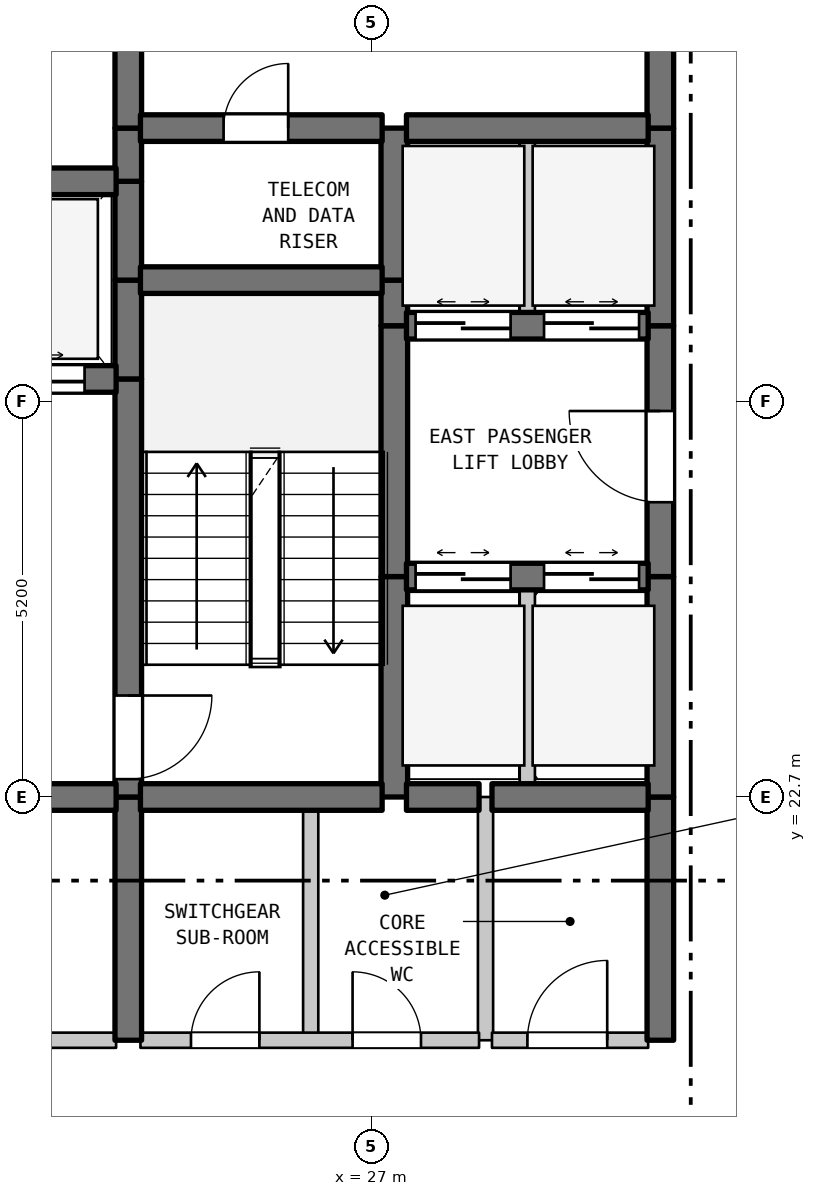
"""IFC4 building model, lengths in metres.
Left out: names, types, materials, properties, quantities, classifications, styles, units other than length and angle.
Written with IfcOpenShell. Run it as: python <this file> out.ifc"""

import sys

from ifc_helpers import new_model, si_unit, direction, frame, frame_2d, origin, place, context, subcontext, project, spatial, rectangle, extrude, element, fill, save


model = new_model("IFC4")
c1 = context("Model", 3, precision=1e-05, world=origin(), true_north=direction((0.0, 1.0)))
c2 = subcontext(c1, "Body", "Model", "MODEL_VIEW")
j1 = project(units=[si_unit("LENGTHUNIT", "METRE"), si_unit("PLANEANGLEUNIT", "RADIAN")], contexts=[c1])
p1 = place(None, origin())
s1 = spatial("IfcSite", under=j1, at=p1, CompositionType="ELEMENT")
p2 = place(p1, origin())
s2 = spatial("IfcBuilding", under=s1, at=p2, CompositionType="ELEMENT")
p3 = place(p2, frame((0.0, 0.0, 73.8)))
s3 = spatial("IfcBuildingStorey", under=s2, at=p3, CompositionType="ELEMENT", Elevation=73.8)
p4 = place(p3, frame((23.8, 19.5, 0.0), z_axis=(0.0, 0.0, 1.0), x_axis=(0.0, 1.0, 0.0)))
e1 = element("IfcWall", 1, at=p4, inside=s3, PredefinedType="SHEAR", context=c2, shape_type="SweptSolid", body=[
    extrude(rectangle(XDim=3.2, YDim=0.35, at=frame_2d((1.6, 0.0))), origin(), (0.0, 0.0, 1.0), 3.385),
])
p5 = place(p3, frame((23.8, 22.7, 0.0), z_axis=(0.0, 0.0, 1.0), x_axis=(0.0, 1.0, 0.0)))
e2 = element("IfcWall", 2, at=p5, inside=s3, PredefinedType="SHEAR", context=c2, shape_type="SweptSolid", body=[
    extrude(rectangle(XDim=5.5, YDim=0.35, at=frame_2d((2.75, 0.0))), origin(), (0.0, 0.0, 1.0), 3.385),
])
p6 = place(p5, frame((0.235, 0.0, 0.0)))
e3 = element("IfcOpeningElement", 3, at=p6, cuts=e2, PredefinedType="OPENING", context=c2, shape_type="SweptSolid", body=[
    extrude(rectangle(XDim=1.1, YDim=2.15, at=frame_2d((0.55, 1.075))), frame((0.0, 0.185, 0.0), z_axis=(0.0, -1.0, 0.0), x_axis=(1.0, 0.0, 0.0)), (0.0, 0.0, 1.0), 0.37),
])
for number, where, z_axis, x_axis in (
    (4, (23.8, 28.2, 0.0), (0.0, 0.0, 1.0), (0.0, 1.0, 0.0)),
    (5, (23.8, 29.5, 0.0), (0.0, 0.0, 1.0), (0.0, 1.0, 0.0)),
):
    element("IfcWall", number, at=place(p3, frame(where, z_axis=z_axis, x_axis=x_axis)), inside=s3, PredefinedType="SHEAR", context=c2, shape_type="SweptSolid", body=[
        extrude(rectangle(XDim=1.3, YDim=0.35, at=frame_2d((0.65, 0.0))), origin(), (0.0, 0.0, 1.0), 3.385),
    ])
p7 = place(p3, frame((23.8, 30.8, 0.0), z_axis=(0.0, 0.0, 1.0), x_axis=(0.0, 1.0, 0.0)))
e6 = element("IfcWall", 6, at=p7, inside=s3, PredefinedType="SHEAR", context=c2, shape_type="SweptSolid", body=[
    extrude(rectangle(XDim=0.7, YDim=0.35, at=frame_2d((0.35, 0.0))), origin(), (0.0, 0.0, 1.0), 3.385),
])
p8 = place(p3, frame((23.8, 31.5, 0.0), z_axis=(0.0, 0.0, 1.0), x_axis=(0.0, 1.0, 0.0)))
e7 = element("IfcWall", 7, at=p8, inside=s3, PredefinedType="SHEAR", context=c2, shape_type="SweptSolid", body=[
    extrude(rectangle(XDim=3.5, YDim=0.35, at=frame_2d((1.75, 0.0))), origin(), (0.0, 0.0, 1.0), 3.385),
])
p9 = place(p8, frame((1.127, 0.0, 0.0)))
e8 = element("IfcOpeningElement", 8, at=p9, cuts=e7, PredefinedType="OPENING", context=c2, shape_type="SweptSolid", body=[
    extrude(rectangle(XDim=1.1, YDim=2.15, at=frame_2d((0.55, 1.075))), frame((0.0, 0.185, 0.0), z_axis=(0.0, -1.0, 0.0), x_axis=(1.0, 0.0, 0.0)), (0.0, 0.0, 1.0), 0.37),
])
p10 = place(p3, frame((26.2, 19.5, 0.0), z_axis=(0.0, 0.0, 1.0), x_axis=(0.0, 1.0, 0.0)))
e9 = element("IfcWall", 9, at=p10, inside=s3, PredefinedType="STANDARD", context=c2, shape_type="SweptSolid", body=[
    extrude(rectangle(XDim=3.2, YDim=0.2, at=frame_2d((1.6, 0.0))), origin(), (0.0, 0.0, 1.0), 3.385),
])
p11 = place(p3, frame((27.3, 22.7, 0.0), z_axis=(0.0, 0.0, 1.0), x_axis=(0.0, 1.0, 0.0)))
e10 = element("IfcWall", 10, at=p11, inside=s3, PredefinedType="SHEAR", context=c2, shape_type="SweptSolid", body=[
    extrude(rectangle(XDim=2.9, YDim=0.35, at=frame_2d((1.45, 0.0))), origin(), (0.0, 0.0, 1.0), 3.385),
])
p12 = place(p3, frame((27.3, 25.6, 0.0), z_axis=(0.0, 0.0, 1.0), x_axis=(0.0, 1.0, 0.0)))
e11 = element("IfcWall", 11, at=p12, inside=s3, PredefinedType="SHEAR", context=c2, shape_type="SweptSolid", body=[
    extrude(rectangle(XDim=3.3, YDim=0.35, at=frame_2d((1.65, 0.0))), origin(), (0.0, 0.0, 1.0), 3.385),
])
p13 = place(p3, frame((27.3, 28.9, 0.0), z_axis=(0.0, 0.0, 1.0), x_axis=(0.0, 1.0, 0.0)))
e12 = element("IfcWall", 12, at=p13, inside=s3, PredefinedType="SHEAR", context=c2, shape_type="SweptSolid", body=[
    extrude(rectangle(XDim=0.6, YDim=0.35, at=frame_2d((0.3, 0.0))), origin(), (0.0, 0.0, 1.0), 3.385),
])
p14 = place(p3, frame((27.3, 29.5, 0.0), z_axis=(0.0, 0.0, 1.0), x_axis=(0.0, 1.0, 0.0)))
e13 = element("IfcWall", 13, at=p14, inside=s3, PredefinedType="SHEAR", context=c2, shape_type="SweptSolid", body=[
    extrude(rectangle(XDim=2.0, YDim=0.35, at=frame_2d((1.0, 0.0))), origin(), (0.0, 0.0, 1.0), 3.385),
])
p15 = place(p3, frame((28.5, 19.5, 0.0), z_axis=(0.0, 0.0, 1.0), x_axis=(0.0, 1.0, 0.0)))
e14 = element("IfcWall", 14, at=p15, inside=s3, PredefinedType="STANDARD", context=c2, shape_type="SweptSolid", body=[
    extrude(rectangle(XDim=3.2, YDim=0.2, at=frame_2d((1.6, 0.0))), origin(), (0.0, 0.0, 1.0), 3.385),
])
p16 = place(p3, frame((29.05, 22.7, 0.0), z_axis=(0.0, 0.0, 1.0), x_axis=(0.0, 1.0, 0.0)))
e15 = element("IfcWall", 15, at=p16, inside=s3, PredefinedType="STANDARD", context=c2, shape_type="SweptSolid", body=[
    extrude(rectangle(XDim=2.9, YDim=0.2, at=frame_2d((1.45, 0.0))), origin(), (0.0, 0.0, 1.0), 3.385),
])
p17 = place(p3, frame((29.05, 28.9, 0.0), z_axis=(0.0, 0.0, 1.0), x_axis=(0.0, 1.0, 0.0)))
e16 = element("IfcWall", 16, at=p17, inside=s3, PredefinedType="STANDARD", context=c2, shape_type="SweptSolid", body=[
    extrude(rectangle(XDim=2.6, YDim=0.2, at=frame_2d((1.3, 0.0))), origin(), (0.0, 0.0, 1.0), 3.385),
])
p18 = place(p3, frame((30.8, 19.5, 0.0), z_axis=(0.0, 0.0, 1.0), x_axis=(0.0, 1.0, 0.0)))
e17 = element("IfcWall", 17, at=p18, inside=s3, PredefinedType="SHEAR", context=c2, shape_type="SweptSolid", body=[
    extrude(rectangle(XDim=3.2, YDim=0.35, at=frame_2d((1.6, 0.0))), origin(), (0.0, 0.0, 1.0), 3.385),
])
p19 = place(p3, frame((30.8, 22.7, 0.0), z_axis=(0.0, 0.0, 1.0), x_axis=(0.0, 1.0, 0.0)))
e18 = element("IfcWall", 18, at=p19, inside=s3, PredefinedType="SHEAR", context=c2, shape_type="SweptSolid", body=[
    extrude(rectangle(XDim=2.9, YDim=0.35, at=frame_2d((1.45, 0.0))), origin(), (0.0, 0.0, 1.0), 3.385),
])
p20 = place(p3, frame((30.8, 25.6, 0.0), z_axis=(0.0, 0.0, 1.0), x_axis=(0.0, 1.0, 0.0)))
e19 = element("IfcWall", 19, at=p20, inside=s3, PredefinedType="SHEAR", context=c2, shape_type="SweptSolid", body=[
    extrude(rectangle(XDim=3.3, YDim=0.35, at=frame_2d((1.65, 0.0))), origin(), (0.0, 0.0, 1.0), 3.385),
])
p21 = place(p20, frame((0.978, 0.0, 0.0)))
e20 = element("IfcOpeningElement", 20, at=p21, cuts=e19, PredefinedType="OPENING", context=c2, shape_type="SweptSolid", body=[
    extrude(rectangle(XDim=1.2, YDim=2.2, at=frame_2d((0.6, 1.1))), frame((0.0, 0.185, 0.0), z_axis=(0.0, -1.0, 0.0), x_axis=(1.0, 0.0, 0.0)), (0.0, 0.0, 1.0), 0.37),
])
p22 = place(p3, frame((30.8, 28.9, 0.0), z_axis=(0.0, 0.0, 1.0), x_axis=(0.0, 1.0, 0.0)))
e21 = element("IfcWall", 21, at=p22, inside=s3, PredefinedType="SHEAR", context=c2, shape_type="SweptSolid", body=[
    extrude(rectangle(XDim=2.6, YDim=0.35, at=frame_2d((1.3, 0.0))), origin(), (0.0, 0.0, 1.0), 3.385),
])
p23 = place(p3, frame((30.8, 31.5, 0.0), z_axis=(0.0, 0.0, 1.0), x_axis=(0.0, 1.0, 0.0)))
e22 = element("IfcWall", 22, at=p23, inside=s3, PredefinedType="SHEAR", context=c2, shape_type="SweptSolid", body=[
    extrude(rectangle(XDim=3.5, YDim=0.35, at=frame_2d((1.75, 0.0))), origin(), (0.0, 0.0, 1.0), 3.385),
])
p24 = place(p23, frame((1.15, 0.0, 0.0)))
e23 = element("IfcOpeningElement", 23, at=p24, cuts=e22, PredefinedType="OPENING", context=c2, shape_type="SweptSolid", body=[
    extrude(rectangle(XDim=1.2, YDim=2.2, at=frame_2d((0.6, 1.1))), frame((0.0, 0.185, 0.0), z_axis=(0.0, -1.0, 0.0), x_axis=(1.0, 0.0, 0.0)), (0.0, 0.0, 1.0), 0.37),
])
p25 = place(p3, frame((19.16, 19.5, 0.0), z_axis=(0.0, 0.0, 1.0), x_axis=(1.0, 0.0, 0.0)))
e24 = element("IfcWall", 24, at=p25, inside=s3, PredefinedType="STANDARD", context=c2, shape_type="SweptSolid", body=[
    extrude(rectangle(XDim=4.48, YDim=0.2, at=frame_2d((2.24, 0.0))), origin(), (0.0, 0.0, 1.0), 3.385),
])
p26 = place(p25, frame((1.64, 0.0, 0.0)))
e25 = element("IfcOpeningElement", 25, at=p26, cuts=e24, PredefinedType="OPENING", context=c2, shape_type="SweptSolid", body=[
    extrude(rectangle(XDim=1.2, YDim=2.2, at=frame_2d((0.6, 1.1))), frame((0.0, 0.11, 0.0), z_axis=(0.0, -1.0, 0.0), x_axis=(1.0, 0.0, 0.0)), (0.0, 0.0, 1.0), 0.22),
])
p27 = place(p3, frame((23.96, 19.5, 0.0), z_axis=(0.0, 0.0, 1.0), x_axis=(1.0, 0.0, 0.0)))
e26 = element("IfcWall", 26, at=p27, inside=s3, PredefinedType="STANDARD", context=c2, shape_type="SweptSolid", body=[
    extrude(rectangle(XDim=4.455, YDim=0.2, at=frame_2d((2.228, 0.0))), origin(), (0.0, 0.0, 1.0), 3.385),
])
p28 = place(p27, frame((0.665, 0.0, 0.0)))
e27 = element("IfcOpeningElement", 27, at=p28, cuts=e26, PredefinedType="OPENING", context=c2, shape_type="SweptSolid", body=[
    extrude(rectangle(XDim=0.9, YDim=2.15, at=frame_2d((0.45, 1.075))), frame((0.0, 0.11, 0.0), z_axis=(0.0, -1.0, 0.0), x_axis=(1.0, 0.0, 0.0)), (0.0, 0.0, 1.0), 0.22),
])
p29 = place(p27, frame((2.791, 0.0, 0.0)))
e28 = element("IfcOpeningElement", 28, at=p29, cuts=e26, PredefinedType="OPENING", context=c2, shape_type="SweptSolid", body=[
    extrude(rectangle(XDim=0.9, YDim=2.15, at=frame_2d((0.45, 1.075))), frame((0.0, 0.11, 0.0), z_axis=(0.0, -1.0, 0.0), x_axis=(1.0, 0.0, 0.0)), (0.0, 0.0, 1.0), 0.22),
])
p30 = place(p3, frame((28.585, 19.5, 0.0), z_axis=(0.0, 0.0, 1.0), x_axis=(1.0, 0.0, 0.0)))
e29 = element("IfcWall", 29, at=p30, inside=s3, PredefinedType="STANDARD", context=c2, shape_type="SweptSolid", body=[
    extrude(rectangle(XDim=2.055, YDim=0.2, at=frame_2d((1.027, 0.0))), origin(), (0.0, 0.0, 1.0), 3.385),
])
p31 = place(p30, frame((0.466, 0.0, 0.0)))
e30 = element("IfcOpeningElement", 30, at=p31, cuts=e29, PredefinedType="OPENING", context=c2, shape_type="SweptSolid", body=[
    extrude(rectangle(XDim=1.05, YDim=2.15, at=frame_2d((0.525, 1.075))), frame((0.0, 0.11, 0.0), z_axis=(0.0, -1.0, 0.0), x_axis=(1.0, 0.0, 0.0)), (0.0, 0.0, 1.0), 0.22),
])
p32 = place(p3, frame((19.16, 22.7, 0.0), z_axis=(0.0, 0.0, 1.0), x_axis=(1.0, 0.0, 0.0)))
e31 = element("IfcWall", 31, at=p32, inside=s3, PredefinedType="SHEAR", context=c2, shape_type="SweptSolid", body=[
    extrude(rectangle(XDim=4.48, YDim=0.35, at=frame_2d((2.24, 0.0))), origin(), (0.0, 0.0, 1.0), 3.385),
])
p33 = place(p32, frame((1.64, 0.0, 0.0)))
e32 = element("IfcOpeningElement", 32, at=p33, cuts=e31, PredefinedType="OPENING", context=c2, shape_type="SweptSolid", body=[
    extrude(rectangle(XDim=1.2, YDim=2.2, at=frame_2d((0.6, 1.1))), frame((0.0, 0.185, 0.0), z_axis=(0.0, -1.0, 0.0), x_axis=(1.0, 0.0, 0.0)), (0.0, 0.0, 1.0), 0.37),
])
p34 = place(p3, frame((23.96, 22.7, 0.0), z_axis=(0.0, 0.0, 1.0), x_axis=(1.0, 0.0, 0.0)))
e33 = element("IfcWall", 33, at=p34, inside=s3, PredefinedType="SHEAR", context=c2, shape_type="SweptSolid", body=[
    extrude(rectangle(XDim=3.18, YDim=0.35, at=frame_2d((1.59, 0.0))), origin(), (0.0, 0.0, 1.0), 3.385),
])
p35 = place(p3, frame((27.46, 22.7, 0.0), z_axis=(0.0, 0.0, 1.0), x_axis=(1.0, 0.0, 0.0)))
e34 = element("IfcWall", 34, at=p35, inside=s3, PredefinedType="SHEAR", context=c2, shape_type="SweptSolid", body=[
    extrude(rectangle(XDim=0.955, YDim=0.35, at=frame_2d((0.478, 0.0))), origin(), (0.0, 0.0, 1.0), 3.385),
])
p36 = place(p3, frame((28.585, 22.7, 0.0), z_axis=(0.0, 0.0, 1.0), x_axis=(1.0, 0.0, 0.0)))
e35 = element("IfcWall", 35, at=p36, inside=s3, PredefinedType="SHEAR", context=c2, shape_type="SweptSolid", body=[
    extrude(rectangle(XDim=2.055, YDim=0.35, at=frame_2d((1.027, 0.0))), origin(), (0.0, 0.0, 1.0), 3.385),
])
p37 = place(p3, frame((27.46, 25.6, 0.0), z_axis=(0.0, 0.0, 1.0), x_axis=(1.0, 0.0, 0.0)))
e36 = element("IfcWall", 36, at=p37, inside=s3, PredefinedType="SHEAR", context=c2, shape_type="SweptSolid", body=[
    extrude(rectangle(XDim=3.18, YDim=0.35, at=frame_2d((1.59, 0.0))), origin(), (0.0, 0.0, 1.0), 3.385),
])
p38 = place(p37, frame((0.12, 0.0, 0.0)))
e37 = element("IfcOpeningElement", 37, at=p38, cuts=e36, PredefinedType="OPENING", context=c2, shape_type="SweptSolid", body=[
    extrude(rectangle(XDim=1.25, YDim=2.2, at=frame_2d((0.625, 1.1))), frame((0.0, 0.185, 0.0), z_axis=(0.0, -1.0, 0.0), x_axis=(1.0, 0.0, 0.0)), (0.0, 0.0, 1.0), 0.37),
])
p39 = place(p37, frame((1.81, 0.0, 0.0)))
e38 = element("IfcOpeningElement", 38, at=p39, cuts=e36, PredefinedType="OPENING", context=c2, shape_type="SweptSolid", body=[
    extrude(rectangle(XDim=1.25, YDim=2.2, at=frame_2d((0.625, 1.1))), frame((0.0, 0.185, 0.0), z_axis=(0.0, -1.0, 0.0), x_axis=(1.0, 0.0, 0.0)), (0.0, 0.0, 1.0), 0.37),
])
p40 = place(p3, frame((19.16, 28.2, 0.0), z_axis=(0.0, 0.0, 1.0), x_axis=(1.0, 0.0, 0.0)))
e39 = element("IfcWall", 39, at=p40, inside=s3, PredefinedType="SHEAR", context=c2, shape_type="SweptSolid", body=[
    extrude(rectangle(XDim=4.48, YDim=0.35, at=frame_2d((2.24, 0.0))), origin(), (0.0, 0.0, 1.0), 3.385),
])
p41 = place(p40, frame((0.415, 0.0, 0.0)))
e40 = element("IfcOpeningElement", 40, at=p41, cuts=e39, PredefinedType="OPENING", context=c2, shape_type="SweptSolid", body=[
    extrude(rectangle(XDim=1.25, YDim=2.2, at=frame_2d((0.625, 1.1))), frame((0.0, 0.185, 0.0), z_axis=(0.0, -1.0, 0.0), x_axis=(1.0, 0.0, 0.0)), (0.0, 0.0, 1.0), 0.37),
])
p42 = place(p40, frame((2.815, 0.0, 0.0)))
e41 = element("IfcOpeningElement", 41, at=p42, cuts=e39, PredefinedType="OPENING", context=c2, shape_type="SweptSolid", body=[
    extrude(rectangle(XDim=1.25, YDim=2.2, at=frame_2d((0.625, 1.1))), frame((0.0, 0.185, 0.0), z_axis=(0.0, -1.0, 0.0), x_axis=(1.0, 0.0, 0.0)), (0.0, 0.0, 1.0), 0.37),
])
p43 = place(p3, frame((27.46, 28.9, 0.0), z_axis=(0.0, 0.0, 1.0), x_axis=(1.0, 0.0, 0.0)))
e42 = element("IfcWall", 42, at=p43, inside=s3, PredefinedType="SHEAR", context=c2, shape_type="SweptSolid", body=[
    extrude(rectangle(XDim=3.18, YDim=0.35, at=frame_2d((1.59, 0.0))), origin(), (0.0, 0.0, 1.0), 3.385),
])
p44 = place(p43, frame((0.12, 0.0, 0.0)))
e43 = element("IfcOpeningElement", 43, at=p44, cuts=e42, PredefinedType="OPENING", context=c2, shape_type="SweptSolid", body=[
    extrude(rectangle(XDim=1.25, YDim=2.2, at=frame_2d((0.625, 1.1))), frame((0.0, 0.185, 0.0), z_axis=(0.0, -1.0, 0.0), x_axis=(1.0, 0.0, 0.0)), (0.0, 0.0, 1.0), 0.37),
])
p45 = place(p43, frame((1.81, 0.0, 0.0)))
e44 = element("IfcOpeningElement", 44, at=p45, cuts=e42, PredefinedType="OPENING", context=c2, shape_type="SweptSolid", body=[
    extrude(rectangle(XDim=1.25, YDim=2.2, at=frame_2d((0.625, 1.1))), frame((0.0, 0.185, 0.0), z_axis=(0.0, -1.0, 0.0), x_axis=(1.0, 0.0, 0.0)), (0.0, 0.0, 1.0), 0.37),
])
p46 = place(p3, frame((23.96, 29.5, 0.0), z_axis=(0.0, 0.0, 1.0), x_axis=(1.0, 0.0, 0.0)))
e45 = element("IfcWall", 45, at=p46, inside=s3, PredefinedType="SHEAR", context=c2, shape_type="SweptSolid", body=[
    extrude(rectangle(XDim=3.18, YDim=0.35, at=frame_2d((1.59, 0.0))), origin(), (0.0, 0.0, 1.0), 3.385),
])
p47 = place(p3, frame((19.16, 30.8, 0.0), z_axis=(0.0, 0.0, 1.0), x_axis=(1.0, 0.0, 0.0)))
e46 = element("IfcWall", 46, at=p47, inside=s3, PredefinedType="SHEAR", context=c2, shape_type="SweptSolid", body=[
    extrude(rectangle(XDim=4.48, YDim=0.35, at=frame_2d((2.24, 0.0))), origin(), (0.0, 0.0, 1.0), 3.385),
])
p48 = place(p3, frame((23.96, 31.5, 0.0), z_axis=(0.0, 0.0, 1.0), x_axis=(1.0, 0.0, 0.0)))
e47 = element("IfcWall", 47, at=p48, inside=s3, PredefinedType="SHEAR", context=c2, shape_type="SweptSolid", body=[
    extrude(rectangle(XDim=3.18, YDim=0.35, at=frame_2d((1.59, 0.0))), origin(), (0.0, 0.0, 1.0), 3.385),
])
p49 = place(p48, frame((1.094, 0.0, 0.0)))
e48 = element("IfcOpeningElement", 48, at=p49, cuts=e47, PredefinedType="OPENING", context=c2, shape_type="SweptSolid", body=[
    extrude(rectangle(XDim=0.85, YDim=2.1, at=frame_2d((0.425, 1.05))), frame((0.0, 0.185, 0.0), z_axis=(0.0, -1.0, 0.0), x_axis=(1.0, 0.0, 0.0)), (0.0, 0.0, 1.0), 0.37),
])
p50 = place(p3, frame((27.46, 31.5, 0.0), z_axis=(0.0, 0.0, 1.0), x_axis=(1.0, 0.0, 0.0)))
e49 = element("IfcWall", 49, at=p50, inside=s3, PredefinedType="SHEAR", context=c2, shape_type="SweptSolid", body=[
    extrude(rectangle(XDim=3.18, YDim=0.35, at=frame_2d((1.59, 0.0))), origin(), (0.0, 0.0, 1.0), 3.385),
])
p51 = place(p6, frame((1.1, 0.0, 0.0), z_axis=(0.0, 0.0, 1.0), x_axis=(-1.0, 0.0, 0.0)))
e50 = element("IfcDoor", 50, at=p51, inside=s3, OperationType="SINGLE_SWING_RIGHT", PredefinedType="DOOR", context=c2, shape_type="SweptSolid", body=[
    extrude(rectangle(XDim=1.1, YDim=2.15, at=frame_2d((0.55, 1.075))), frame((0.0, 0.025, 0.0), z_axis=(0.0, -1.0, 0.0), x_axis=(1.0, 0.0, 0.0)), (0.0, 0.0, 1.0), 0.05),
])
fill(e3, e50)
p52 = place(p21, origin())
e51 = element("IfcDoor", 51, at=p52, inside=s3, OperationType="SINGLE_SWING_RIGHT", PredefinedType="DOOR", context=c2, shape_type="SweptSolid", body=[
    extrude(rectangle(XDim=1.2, YDim=2.2, at=frame_2d((0.6, 1.1))), frame((0.0, 0.025, 0.0), z_axis=(0.0, -1.0, 0.0), x_axis=(1.0, 0.0, 0.0)), (0.0, 0.0, 1.0), 0.05),
])
fill(e20, e51)
p53 = place(p28, origin())
e52 = element("IfcDoor", 52, at=p53, inside=s3, OperationType="SINGLE_SWING_RIGHT", PredefinedType="DOOR", context=c2, shape_type="SweptSolid", body=[
    extrude(rectangle(XDim=0.9, YDim=2.15, at=frame_2d((0.45, 1.075))), frame((0.0, 0.025, 0.0), z_axis=(0.0, -1.0, 0.0), x_axis=(1.0, 0.0, 0.0)), (0.0, 0.0, 1.0), 0.05),
])
fill(e27, e52)
p54 = place(p29, origin())
e53 = element("IfcDoor", 53, at=p54, inside=s3, OperationType="SINGLE_SWING_LEFT", PredefinedType="DOOR", context=c2, shape_type="SweptSolid", body=[
    extrude(rectangle(XDim=0.9, YDim=2.15, at=frame_2d((0.45, 1.075))), frame((0.0, 0.025, 0.0), z_axis=(0.0, -1.0, 0.0), x_axis=(1.0, 0.0, 0.0)), (0.0, 0.0, 1.0), 0.05),
])
fill(e28, e53)
p55 = place(p31, origin())
e54 = element("IfcDoor", 54, at=p55, inside=s3, OperationType="SINGLE_SWING_RIGHT", PredefinedType="DOOR", context=c2, shape_type="SweptSolid", body=[
    extrude(rectangle(XDim=1.05, YDim=2.15, at=frame_2d((0.525, 1.075))), frame((0.0, 0.025, 0.0), z_axis=(0.0, -1.0, 0.0), x_axis=(1.0, 0.0, 0.0)), (0.0, 0.0, 1.0), 0.05),
])
fill(e30, e54)
p56 = place(p38, origin())
e55 = element("IfcDoor", 55, at=p56, inside=s3, OperationType="DOUBLE_DOOR_SLIDING", PredefinedType="DOOR", context=c2, shape_type="SweptSolid", body=[
    extrude(rectangle(XDim=1.25, YDim=2.2, at=frame_2d((0.625, 1.1))), frame((0.0, 0.025, 0.0), z_axis=(0.0, -1.0, 0.0), x_axis=(1.0, 0.0, 0.0)), (0.0, 0.0, 1.0), 0.05),
])
fill(e37, e55)
p57 = place(p39, origin())
e56 = element("IfcDoor", 56, at=p57, inside=s3, OperationType="DOUBLE_DOOR_SLIDING", PredefinedType="DOOR", context=c2, shape_type="SweptSolid", body=[
    extrude(rectangle(XDim=1.25, YDim=2.2, at=frame_2d((0.625, 1.1))), frame((0.0, 0.025, 0.0), z_axis=(0.0, -1.0, 0.0), x_axis=(1.0, 0.0, 0.0)), (0.0, 0.0, 1.0), 0.05),
])
fill(e38, e56)
p58 = place(p42, origin())
e57 = element("IfcDoor", 57, at=p58, inside=s3, OperationType="DOUBLE_DOOR_SLIDING", PredefinedType="DOOR", context=c2, shape_type="SweptSolid", body=[
    extrude(rectangle(XDim=1.25, YDim=2.2, at=frame_2d((0.625, 1.1))), frame((0.0, 0.025, 0.0), z_axis=(0.0, -1.0, 0.0), x_axis=(1.0, 0.0, 0.0)), (0.0, 0.0, 1.0), 0.05),
])
fill(e41, e57)
p59 = place(p44, origin())
e58 = element("IfcDoor", 58, at=p59, inside=s3, OperationType="DOUBLE_DOOR_SLIDING", PredefinedType="DOOR", context=c2, shape_type="SweptSolid", body=[
    extrude(rectangle(XDim=1.25, YDim=2.2, at=frame_2d((0.625, 1.1))), frame((0.0, 0.025, 0.0), z_axis=(0.0, -1.0, 0.0), x_axis=(1.0, 0.0, 0.0)), (0.0, 0.0, 1.0), 0.05),
])
fill(e43, e58)
p60 = place(p45, origin())
e59 = element("IfcDoor", 59, at=p60, inside=s3, OperationType="DOUBLE_DOOR_SLIDING", PredefinedType="DOOR", context=c2, shape_type="SweptSolid", body=[
    extrude(rectangle(XDim=1.25, YDim=2.2, at=frame_2d((0.625, 1.1))), frame((0.0, 0.025, 0.0), z_axis=(0.0, -1.0, 0.0), x_axis=(1.0, 0.0, 0.0)), (0.0, 0.0, 1.0), 0.05),
])
fill(e44, e59)
p61 = place(p49, origin())
e60 = element("IfcDoor", 60, at=p61, inside=s3, OperationType="SINGLE_SWING_RIGHT", PredefinedType="DOOR", context=c2, shape_type="SweptSolid", body=[
    extrude(rectangle(XDim=0.85, YDim=2.1, at=frame_2d((0.425, 1.05))), frame((0.0, 0.025, 0.0), z_axis=(0.0, -1.0, 0.0), x_axis=(1.0, 0.0, 0.0)), (0.0, 0.0, 1.0), 0.05),
])
fill(e48, e60)
save(model, sys.argv[1])
